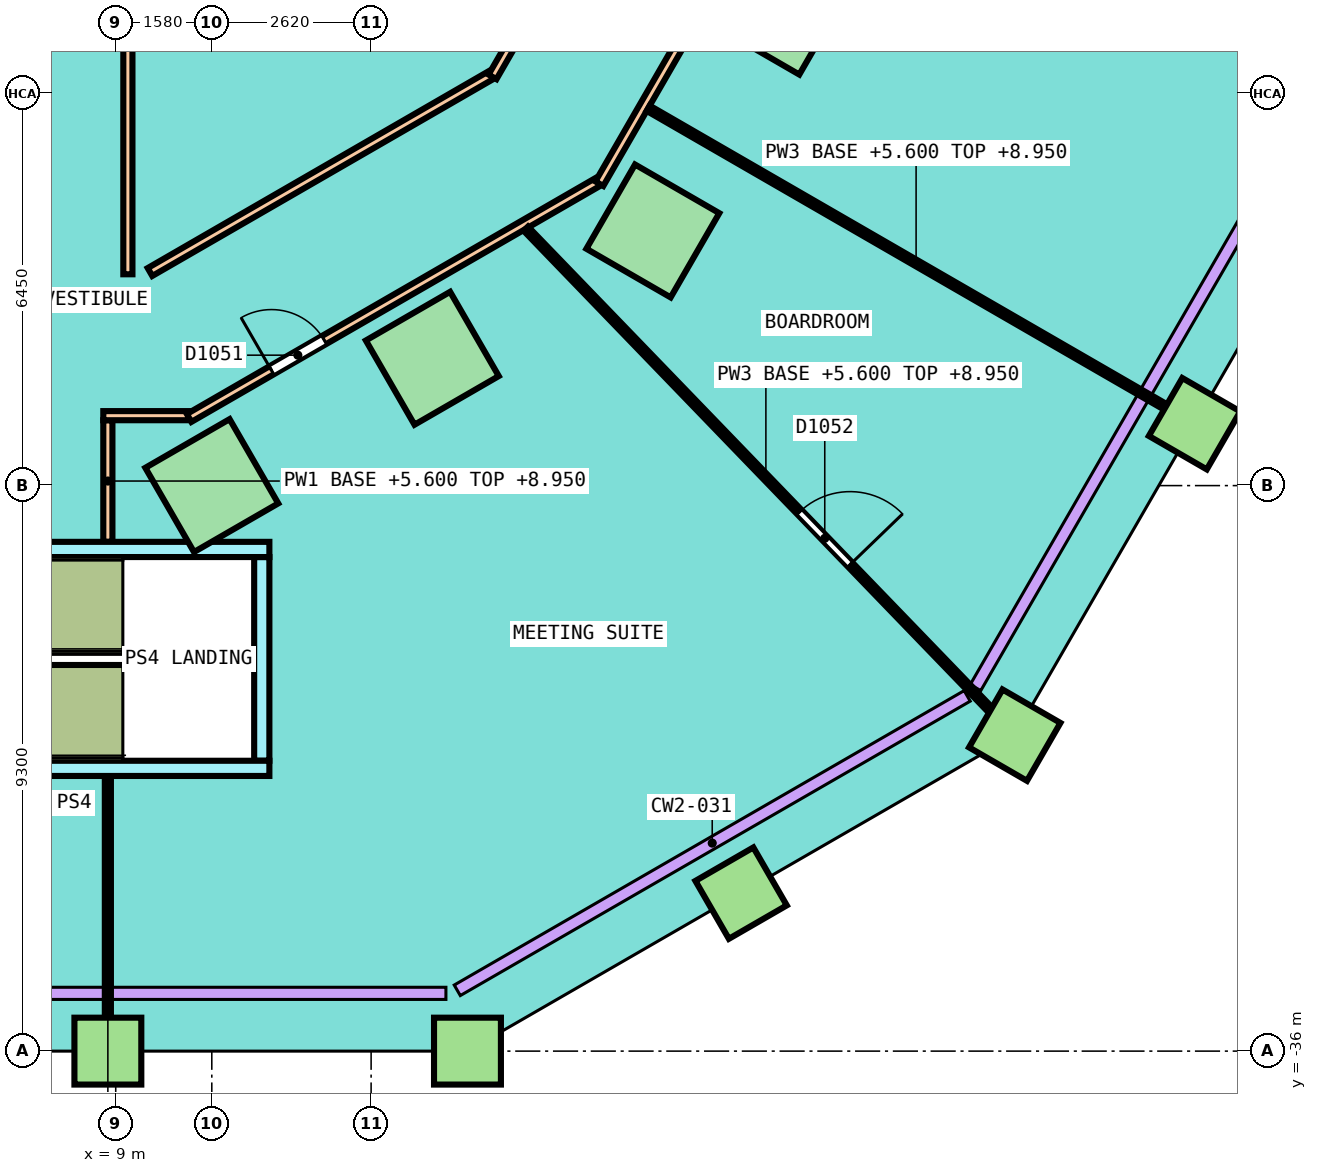
"""IFC4 building model, lengths in metres.
Left out: names, types, materials, properties, quantities, classifications, styles, units other than length and angle.
Written with IfcOpenShell. Run it as: python <this file> out.ifc"""

import sys

from ifc_helpers import new_model, si_unit, direction, frame, frame_2d, origin, origin_2d, place, context, subcontext, project, spatial, rectangle, extrude, element, fill, save


model = new_model("IFC4")
c1 = context("Model", 3, precision=1e-05, world=origin(), true_north=direction((0.0, 1.0)))
c2 = subcontext(c1, "Body", "Model", "MODEL_VIEW")
j1 = project(units=[si_unit("LENGTHUNIT", "METRE"), si_unit("PLANEANGLEUNIT", "RADIAN")], contexts=[c1])
p1 = place(None, origin())
s1 = spatial("IfcSite", under=j1, at=p1, CompositionType="ELEMENT")
p2 = place(p1, origin())
s2 = spatial("IfcBuilding", under=s1, at=p2, CompositionType="ELEMENT")
p3 = place(p2, frame((0.0, 0.0, 5.6)))
s3 = spatial("IfcBuildingStorey", under=s2, at=p3, CompositionType="ELEMENT", Elevation=5.6)
for number, where, z_axis, x_axis in (
    (1, (10.58, -26.7, 0.0), (0.0, 0.0, 1.0), (0.866, 0.5, 0.0)),
    (2, (14.206, -24.606, 0.0), (0.0, 0.0, 1.0), (0.866, 0.5, 0.0)),
    (3, (17.833, -22.512, 0.0), (0.0, 0.0, 1.0), (0.5, 0.866, 0.0)),
    (4, (19.949, -18.847, 0.0), (0.0, 0.0, 1.0), (0.5, 0.866, 0.0)),
):
    element("IfcColumn", number, at=place(p3, frame(where, z_axis=z_axis, x_axis=x_axis)), inside=s3, PredefinedType="COLUMN", context=c2, shape_type="SweptSolid", body=[
        extrude(rectangle(XDim=1.6, YDim=1.6, at=origin_2d()), origin(), (0.0, 0.0, 1.0), 4.25),
    ])
for number, where, z_axis, x_axis in (
    (5, (8.871, -36.0, 0.0), (0.0, 0.0, 1.0), (1.0, 0.0, 0.0)),
    (6, (14.785, -36.0, 0.0), (0.0, 0.0, 1.0), (1.0, 0.0, 0.0)),
    (7, (19.285, -33.402, 0.0), (0.0, 0.0, 1.0), (0.866, 0.5, 0.0)),
    (8, (23.785, -30.804, 0.0), (0.0, 0.0, 1.0), (0.5, 0.866, 0.0)),
    (9, (26.741, -25.682, 0.0), (0.0, 0.0, 1.0), (0.5, 0.866, 0.0)),
):
    element("IfcColumn", number, at=place(p3, frame(where, z_axis=z_axis, x_axis=x_axis)), inside=s3, PredefinedType="COLUMN", context=c2, shape_type="SweptSolid", body=[
        extrude(rectangle(XDim=1.1, YDim=1.1, at=origin_2d()), origin(), (0.0, 0.0, 1.0), 4.25),
    ])
p4 = place(p3, frame((8.871, -27.625, 0.0), z_axis=(0.0, 0.0, 1.0), x_axis=(0.0, 1.0, 0.0)))
e10 = element("IfcWall", 10, at=p4, inside=s3, PredefinedType="PARTITIONING", context=c2, shape_type="SweptSolid", body=[
    extrude(rectangle(XDim=2.0, YDim=0.15, at=frame_2d((1.0, 0.0))), origin(), (0.0, 0.0, 1.0), 3.35),
])
p5 = place(p3, frame((8.796, -25.55, 0.0), z_axis=(0.0, 0.0, 1.0), x_axis=(1.0, 0.0, 0.0)))
e11 = element("IfcWall", 11, at=p5, inside=s3, PredefinedType="PARTITIONING", context=c2, shape_type="SweptSolid", body=[
    extrude(rectangle(XDim=1.401, YDim=0.15, at=frame_2d((0.7, 0.0))), origin(), (0.0, 0.0, 1.0), 3.2),
])
p6 = place(p3, frame((10.207, -25.587, 0.0), z_axis=(0.0, 0.0, 1.0), x_axis=(0.866023143435, 0.50000391502, 0.0)))
e12 = element("IfcWall", 12, at=p6, inside=s3, PredefinedType="PARTITIONING", context=c2, shape_type="SweptSolid", body=[
    extrude(rectangle(XDim=7.759, YDim=0.15, at=frame_2d((3.879, 0.0))), origin(), (0.0, 0.0, 1.0), 3.2),
])
p7 = place(p6, frame((1.565, 0.0, 0.0)))
e13 = element("IfcOpeningElement", 13, at=p7, cuts=e12, PredefinedType="OPENING", context=c2, shape_type="SweptSolid", body=[
    extrude(rectangle(XDim=1.0, YDim=2.1, at=frame_2d((0.5, 1.05))), frame((0.0, 0.085, 0.0), z_axis=(0.0, -1.0, 0.0), x_axis=(1.0, 0.0, 0.0)), (0.0, 0.0, 1.0), 0.17),
])
p8 = place(p3, frame((16.954, -21.736, 0.0), z_axis=(0.0, 0.0, 1.0), x_axis=(0.499996491498, 0.86602742941, 0.0)))
e14 = element("IfcWall", 14, at=p8, inside=s3, PredefinedType="PARTITIONING", context=c2, shape_type="SweptSolid", body=[
    extrude(rectangle(XDim=20.694, YDim=0.15, at=frame_2d((10.347, 0.0))), origin(), (0.0, 0.0, 1.0), 3.2),
])
p9 = place(p8, frame((13.896, 0.0, 0.0)))
e15 = element("IfcOpeningElement", 15, at=p9, cuts=e14, PredefinedType="OPENING", context=c2, shape_type="SweptSolid", body=[
    extrude(rectangle(XDim=1.2, YDim=2.1, at=frame_2d((0.6, 1.05))), frame((0.0, 0.085, 0.0), z_axis=(0.0, -1.0, 0.0), x_axis=(1.0, 0.0, 0.0)), (0.0, 0.0, 1.0), 0.17),
])
p10 = place(p3, frame((9.564, -23.188, 0.0), z_axis=(0.0, 0.0, 1.0), x_axis=(0.866024786089, 0.500001069878, 0.0)))
e16 = element("IfcWall", 16, at=p10, inside=s3, PredefinedType="PARTITIONING", context=c2, shape_type="SweptSolid", body=[
    extrude(rectangle(XDim=6.473, YDim=0.15, at=frame_2d((3.236, 0.0))), origin(), (0.0, 0.0, 1.0), 3.2),
])
p11 = place(p3, frame((15.197, -19.979, 0.0), z_axis=(0.0, 0.0, 1.0), x_axis=(0.500000497866, 0.866025116341, 0.0)))
e17 = element("IfcWall", 17, at=p11, inside=s3, PredefinedType="PARTITIONING", context=c2, shape_type="SweptSolid", body=[
    extrude(rectangle(XDim=19.407, YDim=0.15, at=frame_2d((9.704, 0.0))), origin(), (0.0, 0.0, 1.0), 3.2),
])
p12 = place(p11, frame((6.5, 0.0, 0.0)))
e18 = element("IfcOpeningElement", 18, at=p12, cuts=e17, PredefinedType="OPENING", context=c2, shape_type="SweptSolid", body=[
    extrude(rectangle(XDim=1.2, YDim=2.1, at=frame_2d((0.6, 1.05))), frame((0.0, 0.085, 0.0), z_axis=(0.0, -1.0, 0.0), x_axis=(1.0, 0.0, 0.0)), (0.0, 0.0, 1.0), 0.17),
])
p13 = place(p3, frame((9.2, -23.225, 0.0), z_axis=(0.0, 0.0, 1.0), x_axis=(0.0, 1.0, 0.0)))
e19 = element("IfcWall", 19, at=p13, inside=s3, PredefinedType="PARTITIONING", context=c2, shape_type="SweptSolid", body=[
    extrude(rectangle(XDim=9.05, YDim=0.15, at=frame_2d((4.525, 0.0))), origin(), (0.0, 0.0, 1.0), 3.2),
])
p14 = place(p3, frame((8.871, -35.8, 0.0), z_axis=(0.0, 0.0, 1.0), x_axis=(0.0, 1.0, 0.0)))
e20 = element("IfcWall", 20, at=p14, inside=s3, PredefinedType="PARTITIONING", context=c2, shape_type="SweptSolid", body=[
    extrude(rectangle(XDim=4.325, YDim=0.1, at=frame_2d((2.163, 0.0))), origin(), (0.0, 0.0, 1.0), 4.25),
])
p15 = place(p3, frame((17.757, -20.495, 0.0), z_axis=(0.0, 0.0, 1.0), x_axis=(0.866028554658, -0.499994542487, 0.0)))
e21 = element("IfcWall", 21, at=p15, inside=s3, PredefinedType="PARTITIONING", context=c2, shape_type="SweptSolid", body=[
    extrude(rectangle(XDim=10.175, YDim=0.1, at=frame_2d((5.087, 0.0))), origin(), (0.0, 0.0, 1.0), 3.35),
])
p16 = place(p3, frame((15.744, -22.475, 0.0), z_axis=(0.0, 0.0, 1.0), x_axis=(0.694530893364, -0.719462881713, 0.0)))
e22 = element("IfcWall", 22, at=p16, inside=s3, PredefinedType="PARTITIONING", context=c2, shape_type="SweptSolid", body=[
    extrude(rectangle(XDim=11.369, YDim=0.1, at=frame_2d((5.685, 0.0))), origin(), (0.0, 0.0, 1.0), 3.35),
])
p17 = place(p16, frame((6.479, 0.0, 0.0)))
e23 = element("IfcOpeningElement", 23, at=p17, cuts=e22, PredefinedType="OPENING", context=c2, shape_type="SweptSolid", body=[
    extrude(rectangle(XDim=1.2, YDim=2.1, at=frame_2d((0.6, 1.05))), frame((0.0, 0.06, 0.0), z_axis=(0.0, -1.0, 0.0), x_axis=(1.0, 0.0, 0.0)), (0.0, 0.0, 1.0), 0.12),
])
p18 = place(p3, frame((11.402, -31.225, 0.0), z_axis=(0.0, 0.0, 1.0), x_axis=(0.0, 1.0, 0.0)))
e24 = element("IfcWall", 24, at=p18, inside=s3, PredefinedType="SOLIDWALL", context=c2, shape_type="SweptSolid", body=[
    extrude(rectangle(XDim=3.35, YDim=0.25, at=frame_2d((1.675, 0.0))), origin(), (0.0, 0.0, 1.0), 4.25),
])
p19 = place(p3, frame((3.032, -27.75, 0.0), z_axis=(0.0, 0.0, 1.0), x_axis=(1.0, 0.0, 0.0)))
e25 = element("IfcWall", 25, at=p19, inside=s3, PredefinedType="SOLIDWALL", context=c2, shape_type="SweptSolid", body=[
    extrude(rectangle(XDim=8.495, YDim=0.25, at=frame_2d((4.248, 0.0))), origin(), (0.0, 0.0, 1.0), 4.25),
])
p20 = place(p19, frame((1.8, 0.0, 0.0), z_axis=(0.0, 0.0, 1.0), x_axis=(-1.0, 0.0, 0.0)))
e26 = element("IfcOpeningElement", 26, at=p20, cuts=e25, PredefinedType="OPENING", context=c2, shape_type="SweptSolid", body=[
    extrude(rectangle(XDim=1.2, YDim=2.1, at=frame_2d((0.6, 1.05))), frame((0.0, 0.135, 0.0), z_axis=(0.0, -1.0, 0.0), x_axis=(1.0, 0.0, 0.0)), (0.0, 0.0, 1.0), 0.27),
])
p21 = place(p3, frame((3.007, -31.35, 0.0), z_axis=(0.0, 0.0, 1.0), x_axis=(1.0, 0.0, 0.0)))
e27 = element("IfcWall", 27, at=p21, inside=s3, PredefinedType="SOLIDWALL", context=c2, shape_type="SweptSolid", body=[
    extrude(rectangle(XDim=8.52, YDim=0.25, at=frame_2d((4.26, 0.0))), origin(), (0.0, 0.0, 1.0), 4.25),
])
p22 = place(p3, frame((24.277, -29.951, 0.0), z_axis=(0.0, 0.0, 1.0), x_axis=(0.866031096941, -0.499990139034, 0.0)))
e28 = element("IfcWall", 28, at=p22, inside=s3, PredefinedType="SOLIDWALL", context=c2, shape_type="SweptSolid", body=[
    extrude(rectangle(XDim=3.0, YDim=0.4, at=frame_2d((1.5, 0.0))), origin(), (0.0, 0.0, 1.0), 4.6),
])
for number, where, z_axis, x_axis in (
    (29, (24.55, -29.878, 0.0), (0.0, 0.0, 1.0), (0.5, 0.866, 0.0)),
    (30, (26.802, -31.178, 0.0), (0.0, 0.0, 1.0), (0.5, 0.866, 0.0)),
):
    element("IfcWall", number, at=place(p3, frame(where, z_axis=z_axis, x_axis=x_axis)), inside=s3, PredefinedType="SOLIDWALL", context=c2, shape_type="SweptSolid", body=[
        extrude(rectangle(XDim=13.2, YDim=0.4, at=frame_2d((6.6, 0.0))), origin(), (0.0, 0.0, 1.0), 4.6),
    ])
p23 = place(p3, frame((24.077, -30.298, 0.0), z_axis=(0.0, 0.0, 1.0), x_axis=(0.866031096941, -0.499990139034, 0.0)))
e31 = element("IfcWall", 31, at=p23, inside=s3, PredefinedType="SOLIDWALL", context=c2, shape_type="SweptSolid", body=[
    extrude(rectangle(XDim=3.0, YDim=0.4, at=frame_2d((1.5, 0.0))), origin(), (0.0, 0.0, 1.0), 4.6),
])
p24 = place(p3, frame((26.675, -31.798, 0.0), z_axis=(0.0, 0.0, 1.0), x_axis=(0.866000020948, -0.500043961785, 0.0)))
e32 = element("IfcWall", 32, at=p24, inside=s3, PredefinedType="SOLIDWALL", context=c2, shape_type="SweptSolid", body=[
    extrude(rectangle(XDim=1.95, YDim=0.4, at=frame_2d((0.975, 0.0))), origin(), (0.0, 0.0, 1.0), 4.6),
])
p25 = place(p7, origin())
e33 = element("IfcDoor", 33, at=p25, inside=s3, OperationType="SINGLE_SWING_RIGHT", PredefinedType="DOOR", context=c2, shape_type="SweptSolid", body=[
    extrude(rectangle(XDim=1.0, YDim=2.1, at=frame_2d((0.5, 1.05))), frame((0.0, 0.025, 0.0), z_axis=(0.0, -1.0, 0.0), x_axis=(1.0, 0.0, 0.0)), (0.0, 0.0, 1.0), 0.05),
])
fill(e13, e33)
p26 = place(p17, origin())
e34 = element("IfcDoor", 34, at=p26, inside=s3, OperationType="DOUBLE_DOOR_SINGLE_SWING", PredefinedType="DOOR", context=c2, shape_type="SweptSolid", body=[
    extrude(rectangle(XDim=1.2, YDim=2.1, at=frame_2d((0.6, 1.05))), frame((0.0, 0.025, 0.0), z_axis=(0.0, -1.0, 0.0), x_axis=(1.0, 0.0, 0.0)), (0.0, 0.0, 1.0), 0.05),
])
fill(e23, e34)
save(model, sys.argv[1])
